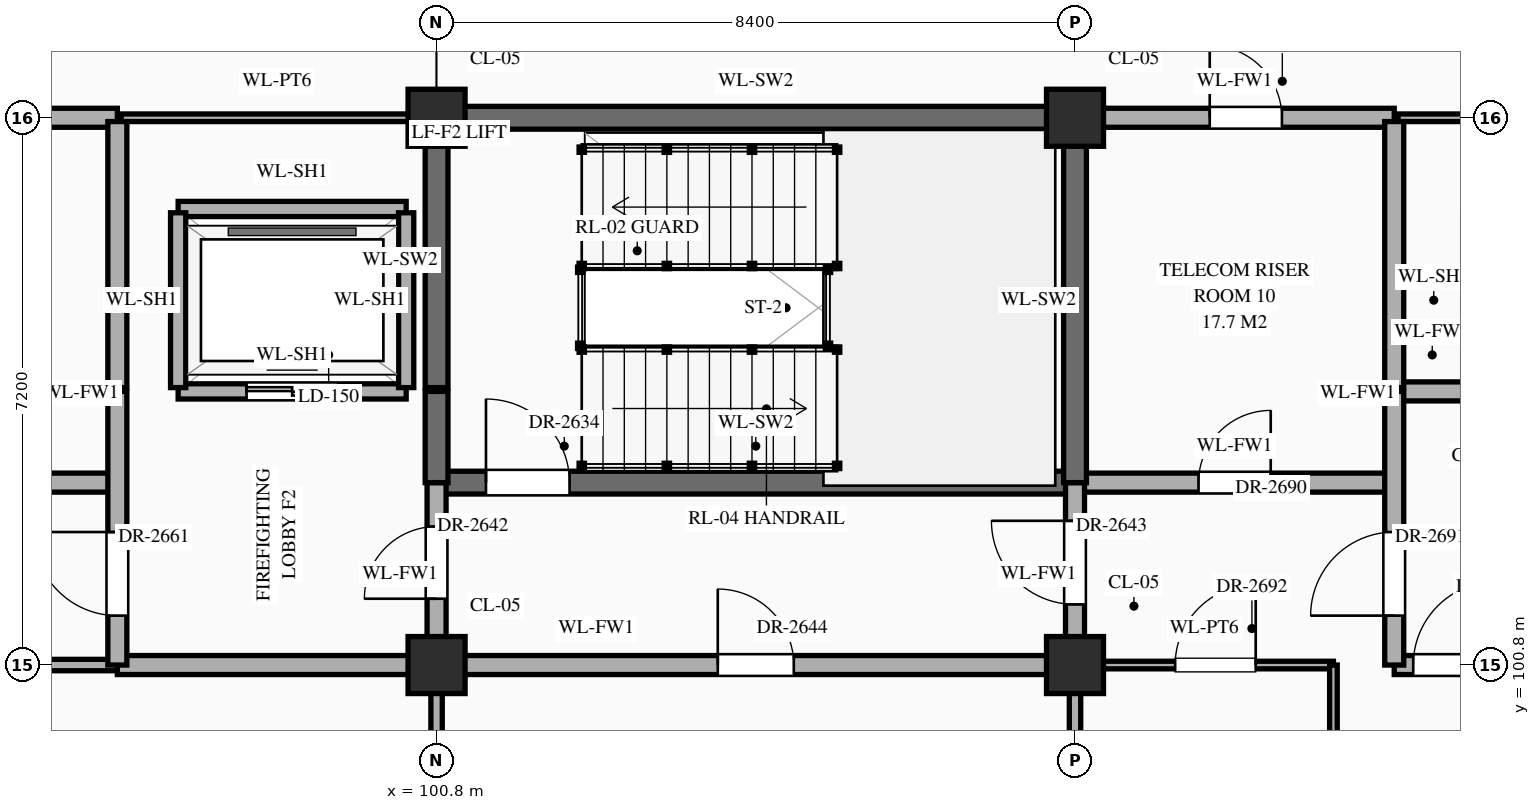
"""IFC4 building model, lengths in metres.
Left out: names, types, materials, properties, quantities, classifications, styles, units other than length and angle.
Written with IfcOpenShell. Run it as: python <this file> out.ifc"""

import sys

from ifc_helpers import new_model, si_unit, direction, frame, frame_2d, origin, origin_2d, place, context, subcontext, project, spatial, rectangle, extrude, element, fill, save


model = new_model("IFC4")
c1 = context("Model", 3, precision=1e-05, world=origin(), true_north=direction((0.0, 1.0)))
c2 = subcontext(c1, "Body", "Model", "MODEL_VIEW")
j1 = project(units=[si_unit("LENGTHUNIT", "METRE"), si_unit("PLANEANGLEUNIT", "RADIAN")], contexts=[c1])
p1 = place(None, origin())
s1 = spatial("IfcSite", under=j1, at=p1, CompositionType="ELEMENT")
p2 = place(p1, origin())
s2 = spatial("IfcBuilding", under=s1, at=p2, CompositionType="ELEMENT")
p3 = place(p2, frame((0.0, 0.0, 39.3)))
s3 = spatial("IfcBuildingStorey", under=s2, at=p3, CompositionType="ELEMENT", Elevation=39.3)
for number, where, z_axis, x_axis in (
    (1, (100.8, 100.8, 0.0), (0.0, 0.0, 1.0), (1.0, 0.0, 0.0)),
    (2, (100.8, 108.0, 0.0), (0.0, 0.0, 1.0), (1.0, 0.0, 0.0)),
    (3, (109.2, 100.8, 0.0), (0.0, 0.0, 1.0), (1.0, 0.0, 0.0)),
    (4, (109.2, 108.0, 0.0), (0.0, 0.0, 1.0), (1.0, 0.0, 0.0)),
):
    element("IfcColumn", number, at=place(p3, frame(where, z_axis=z_axis, x_axis=x_axis)), inside=s3, PredefinedType="COLUMN", context=c2, shape_type="SweptSolid", body=[
        extrude(rectangle(XDim=0.75, YDim=0.75, at=origin_2d()), origin(), (0.0, 0.0, 1.0), 4.2),
    ])
p4 = place(p3, frame((92.4, 100.8, 0.0), z_axis=(0.0, 0.0, 1.0), x_axis=(1.0, 0.0, 0.0)))
e5 = element("IfcWall", 5, at=p4, inside=s3, PredefinedType="STANDARD", context=c2, shape_type="SweptSolid", body=[
    extrude(rectangle(XDim=4.2, YDim=0.15, at=frame_2d((2.1, 0.0))), origin(), (0.0, 0.0, 1.0), 3.1),
])
p5 = place(p4, frame((1.768, 0.0, 0.0)))
e6 = element("IfcOpeningElement", 6, at=p5, cuts=e5, PredefinedType="OPENING", context=c2, shape_type="SweptSolid", body=[
    extrude(rectangle(XDim=0.96, YDim=2.2, at=frame_2d((0.48, 1.1))), frame((0.0, 0.087, 0.0), z_axis=(0.0, -1.0, 0.0), x_axis=(1.0, 0.0, 0.0)), (0.0, 0.0, 1.0), 0.174),
])
p6 = place(p3, frame((96.6, 100.8, 0.0), z_axis=(0.0, 0.0, 1.0), x_axis=(1.0, 0.0, 0.0)))
e7 = element("IfcWall", 7, at=p6, inside=s3, PredefinedType="STANDARD", context=c2, shape_type="SweptSolid", body=[
    extrude(rectangle(XDim=12.6, YDim=0.25, at=frame_2d((6.3, 0.0))), origin(), (0.0, 0.0, 1.0), 3.1),
])
p7 = place(p6, frame((7.9, 0.0, 0.0)))
e8 = element("IfcOpeningElement", 8, at=p7, cuts=e7, PredefinedType="OPENING", context=c2, shape_type="SweptSolid", body=[
    extrude(rectangle(XDim=1.0, YDim=2.2, at=frame_2d((0.5, 1.1))), frame((0.0, 0.137, 0.0), z_axis=(0.0, -1.0, 0.0), x_axis=(1.0, 0.0, 0.0)), (0.0, 0.0, 1.0), 0.274),
])
p8 = place(p3, frame((109.2, 100.8, 0.0), z_axis=(0.0, 0.0, 1.0), x_axis=(1.0, 0.0, 0.0)))
e9 = element("IfcWall", 9, at=p8, inside=s3, PredefinedType="STANDARD", context=c2, shape_type="SweptSolid", body=[
    extrude(rectangle(XDim=3.4, YDim=0.1, at=frame_2d((1.7, 0.0))), origin(), (0.0, 0.0, 1.0), 3.1),
])
p9 = place(p8, frame((1.317, 0.0, 0.0)))
e10 = element("IfcOpeningElement", 10, at=p9, cuts=e9, PredefinedType="OPENING", context=c2, shape_type="SweptSolid", body=[
    extrude(rectangle(XDim=1.06, YDim=2.4, at=frame_2d((0.53, 1.2))), frame((0.0, 0.062, 0.0), z_axis=(0.0, -1.0, 0.0), x_axis=(1.0, 0.0, 0.0)), (0.0, 0.0, 1.0), 0.124),
])
p10 = place(p3, frame((113.4, 100.8, 0.0), z_axis=(0.0, 0.0, 1.0), x_axis=(1.0, 0.0, 0.0)))
e11 = element("IfcWall", 11, at=p10, inside=s3, PredefinedType="STANDARD", context=c2, shape_type="SweptSolid", body=[
    extrude(rectangle(XDim=4.2, YDim=0.25, at=frame_2d((2.1, 0.0))), origin(), (0.0, 0.0, 1.0), 3.1),
])
p11 = place(p10, frame((0.25, 0.0, 0.0)))
e12 = element("IfcOpeningElement", 12, at=p11, cuts=e11, PredefinedType="OPENING", context=c2, shape_type="SweptSolid", body=[
    extrude(rectangle(XDim=1.1, YDim=2.2, at=frame_2d((0.55, 1.1))), frame((0.0, 0.137, 0.0), z_axis=(0.0, -1.0, 0.0), x_axis=(1.0, 0.0, 0.0)), (0.0, 0.0, 1.0), 0.274),
])
p12 = place(p10, frame((2.252, 0.0, 0.0)))
e13 = element("IfcOpeningElement", 13, at=p12, cuts=e11, PredefinedType="OPENING", context=c2, shape_type="SweptSolid", body=[
    extrude(rectangle(XDim=1.0, YDim=2.2, at=frame_2d((0.5, 1.1))), frame((0.0, 0.137, 0.0), z_axis=(0.0, -1.0, 0.0), x_axis=(1.0, 0.0, 0.0)), (0.0, 0.0, 1.0), 0.274),
])
p13 = place(p3, frame((92.4, 103.2, 0.0), z_axis=(0.0, 0.0, 1.0), x_axis=(1.0, 0.0, 0.0)))
e14 = element("IfcWall", 14, at=p13, inside=s3, PredefinedType="STANDARD", context=c2, shape_type="SweptSolid", body=[
    extrude(rectangle(XDim=4.2, YDim=0.25, at=frame_2d((2.1, 0.0))), origin(), (0.0, 0.0, 1.0), 3.95),
])
p14 = place(p13, frame((1.625, 0.0, 0.0)))
e15 = element("IfcOpeningElement", 15, at=p14, cuts=e14, PredefinedType="OPENING", context=c2, shape_type="SweptSolid", body=[
    extrude(rectangle(XDim=0.95, YDim=2.15, at=frame_2d((0.475, 1.075))), frame((0.0, 0.137, 0.0), z_axis=(0.0, -1.0, 0.0), x_axis=(1.0, 0.0, 0.0)), (0.0, 0.0, 1.0), 0.274),
])
p15 = place(p3, frame((100.8, 103.2, 0.0), z_axis=(0.0, 0.0, 1.0), x_axis=(1.0, 0.0, 0.0)))
e16 = element("IfcWall", 16, at=p15, inside=s3, PredefinedType="SHEAR", context=c2, shape_type="SweptSolid", body=[
    extrude(rectangle(XDim=8.4, YDim=0.3, at=frame_2d((4.2, 0.0))), origin(), (0.0, 0.0, 1.0), 3.95),
])
p16 = place(p15, frame((0.65, 0.0, 0.0)))
e17 = element("IfcOpeningElement", 17, at=p16, cuts=e16, PredefinedType="OPENING", context=c2, shape_type="SweptSolid", body=[
    extrude(rectangle(XDim=1.1, YDim=2.2, at=frame_2d((0.55, 1.1))), frame((0.0, 0.162, 0.0), z_axis=(0.0, -1.0, 0.0), x_axis=(1.0, 0.0, 0.0)), (0.0, 0.0, 1.0), 0.324),
])
p17 = place(p3, frame((109.2, 103.2, 0.0), z_axis=(0.0, 0.0, 1.0), x_axis=(1.0, 0.0, 0.0)))
e18 = element("IfcWall", 18, at=p17, inside=s3, PredefinedType="STANDARD", context=c2, shape_type="SweptSolid", body=[
    extrude(rectangle(XDim=4.2, YDim=0.25, at=frame_2d((2.1, 0.0))), origin(), (0.0, 0.0, 1.0), 3.95),
])
p18 = place(p17, frame((1.625, 0.0, 0.0)))
e19 = element("IfcOpeningElement", 19, at=p18, cuts=e18, PredefinedType="OPENING", context=c2, shape_type="SweptSolid", body=[
    extrude(rectangle(XDim=0.95, YDim=2.15, at=frame_2d((0.475, 1.075))), frame((0.0, 0.137, 0.0), z_axis=(0.0, -1.0, 0.0), x_axis=(1.0, 0.0, 0.0)), (0.0, 0.0, 1.0), 0.274),
])
p19 = place(p3, frame((97.4, 104.4, 0.0), z_axis=(0.0, 0.0, 1.0), x_axis=(1.0, 0.0, 0.0)))
e20 = element("IfcWall", 20, at=p19, inside=s3, PredefinedType="STANDARD", context=c2, shape_type="SweptSolid", body=[
    extrude(rectangle(XDim=3.0, YDim=0.2, at=frame_2d((1.5, 0.0))), origin(), (0.0, 0.0, 1.0), 3.95),
])
p20 = place(p19, frame((0.9, 0.0, 0.0)))
e21 = element("IfcOpeningElement", 21, at=p20, cuts=e20, PredefinedType="OPENING", context=c2, shape_type="SweptSolid", body=[
    extrude(rectangle(XDim=1.2, YDim=2.15, at=frame_2d((0.6, 1.075))), frame((0.0, 0.112, 0.0), z_axis=(0.0, -1.0, 0.0), x_axis=(1.0, 0.0, 0.0)), (0.0, 0.0, 1.0), 0.224),
])
p21 = place(p3, frame((113.45, 104.4, 0.0), z_axis=(0.0, 0.0, 1.0), x_axis=(1.0, 0.0, 0.0)))
e22 = element("IfcWall", 22, at=p21, inside=s3, PredefinedType="STANDARD", context=c2, shape_type="SweptSolid", body=[
    extrude(rectangle(XDim=0.9, YDim=0.25, at=frame_2d((0.45, 0.0))), origin(), (0.0, 0.0, 1.0), 3.95),
])
p22 = place(p3, frame((97.4, 106.8, 0.0), z_axis=(0.0, 0.0, 1.0), x_axis=(1.0, 0.0, 0.0)))
e23 = element("IfcWall", 23, at=p22, inside=s3, PredefinedType="STANDARD", context=c2, shape_type="SweptSolid", body=[
    extrude(rectangle(XDim=3.0, YDim=0.2, at=frame_2d((1.5, 0.0))), origin(), (0.0, 0.0, 1.0), 3.95),
])
p23 = place(p3, frame((92.4, 108.0, 0.0), z_axis=(0.0, 0.0, 1.0), x_axis=(1.0, 0.0, 0.0)))
e24 = element("IfcWall", 24, at=p23, inside=s3, PredefinedType="STANDARD", context=c2, shape_type="SweptSolid", body=[
    extrude(rectangle(XDim=4.2, YDim=0.25, at=frame_2d((2.1, 0.0))), origin(), (0.0, 0.0, 1.0), 3.1),
])
p24 = place(p23, frame((1.698, 0.0, 0.0)))
e25 = element("IfcOpeningElement", 25, at=p24, cuts=e24, PredefinedType="OPENING", context=c2, shape_type="SweptSolid", body=[
    extrude(rectangle(XDim=1.1, YDim=2.2, at=frame_2d((0.55, 1.1))), frame((0.0, 0.137, 0.0), z_axis=(0.0, -1.0, 0.0), x_axis=(1.0, 0.0, 0.0)), (0.0, 0.0, 1.0), 0.274),
])
p25 = place(p3, frame((96.65, 108.0, 0.0), z_axis=(0.0, 0.0, 1.0), x_axis=(1.0, 0.0, 0.0)))
e26 = element("IfcWall", 26, at=p25, inside=s3, PredefinedType="STANDARD", context=c2, shape_type="SweptSolid", body=[
    extrude(rectangle(XDim=4.1, YDim=0.1, at=frame_2d((2.05, 0.0))), origin(), (0.0, 0.0, 1.0), 3.1),
])
p26 = place(p3, frame((100.8, 108.0, 0.0), z_axis=(0.0, 0.0, 1.0), x_axis=(1.0, 0.0, 0.0)))
e27 = element("IfcWall", 27, at=p26, inside=s3, PredefinedType="SHEAR", context=c2, shape_type="SweptSolid", body=[
    extrude(rectangle(XDim=8.4, YDim=0.3, at=frame_2d((4.2, 0.0))), origin(), (0.0, 0.0, 1.0), 3.95),
])
p27 = place(p3, frame((109.2, 108.0, 0.0), z_axis=(0.0, 0.0, 1.0), x_axis=(1.0, 0.0, 0.0)))
e28 = element("IfcWall", 28, at=p27, inside=s3, PredefinedType="STANDARD", context=c2, shape_type="SweptSolid", body=[
    extrude(rectangle(XDim=4.2, YDim=0.25, at=frame_2d((2.1, 0.0))), origin(), (0.0, 0.0, 1.0), 3.1),
])
p28 = place(p27, frame((1.772, 0.0, 0.0)))
e29 = element("IfcOpeningElement", 29, at=p28, cuts=e28, PredefinedType="OPENING", context=c2, shape_type="SweptSolid", body=[
    extrude(rectangle(XDim=0.95, YDim=2.15, at=frame_2d((0.475, 1.075))), frame((0.0, 0.137, 0.0), z_axis=(0.0, -1.0, 0.0), x_axis=(1.0, 0.0, 0.0)), (0.0, 0.0, 1.0), 0.274),
])
p29 = place(p3, frame((113.45, 108.0, 0.0), z_axis=(0.0, 0.0, 1.0), x_axis=(1.0, 0.0, 0.0)))
e30 = element("IfcWall", 30, at=p29, inside=s3, PredefinedType="STANDARD", context=c2, shape_type="SweptSolid", body=[
    extrude(rectangle(XDim=4.06, YDim=0.1, at=frame_2d((2.03, 0.0))), origin(), (0.0, 0.0, 1.0), 3.1),
])
p30 = place(p3, frame((96.6, 100.8, 0.0), z_axis=(0.0, 0.0, 1.0), x_axis=(0.0, 1.0, 0.0)))
e31 = element("IfcWall", 31, at=p30, inside=s3, PredefinedType="STANDARD", context=c2, shape_type="SweptSolid", body=[
    extrude(rectangle(XDim=3.6, YDim=0.25, at=frame_2d((1.8, 0.0))), origin(), (0.0, 0.0, 1.0), 3.95),
])
p31 = place(p30, frame((0.65, 0.0, 0.0)))
e32 = element("IfcOpeningElement", 32, at=p31, cuts=e31, PredefinedType="OPENING", context=c2, shape_type="SweptSolid", body=[
    extrude(rectangle(XDim=1.1, YDim=2.2, at=frame_2d((0.55, 1.1))), frame((0.0, 0.137, 0.0), z_axis=(0.0, -1.0, 0.0), x_axis=(1.0, 0.0, 0.0)), (0.0, 0.0, 1.0), 0.274),
])
p32 = place(p3, frame((96.6, 104.45, 0.0), z_axis=(0.0, 0.0, 1.0), x_axis=(0.0, 1.0, 0.0)))
e33 = element("IfcWall", 33, at=p32, inside=s3, PredefinedType="STANDARD", context=c2, shape_type="SweptSolid", body=[
    extrude(rectangle(XDim=3.5, YDim=0.25, at=frame_2d((1.75, 0.0))), origin(), (0.0, 0.0, 1.0), 3.95),
])
for number, where, z_axis, x_axis in (
    (34, (97.4, 104.45, 0.0), (0.0, 0.0, 1.0), (0.0, 1.0, 0.0)),
    (35, (100.4, 104.45, 0.0), (0.0, 0.0, 1.0), (0.0, 1.0, 0.0)),
):
    element("IfcWall", number, at=place(p3, frame(where, z_axis=z_axis, x_axis=x_axis)), inside=s3, PredefinedType="STANDARD", context=c2, shape_type="SweptSolid", body=[
        extrude(rectangle(XDim=2.3, YDim=0.2, at=frame_2d((1.15, 0.0))), origin(), (0.0, 0.0, 1.0), 3.95),
    ])
p33 = place(p3, frame((100.8, 96.0, 0.0), z_axis=(0.0, 0.0, 1.0), x_axis=(0.0, 1.0, 0.0)))
e36 = element("IfcWall", 36, at=p33, inside=s3, PredefinedType="STANDARD", context=c2, shape_type="SweptSolid", body=[
    extrude(rectangle(XDim=4.8, YDim=0.15, at=frame_2d((2.4, 0.0))), origin(), (0.0, 0.0, 1.0), 3.2),
])
p34 = place(p3, frame((100.8, 100.8, 0.0), z_axis=(0.0, 0.0, 1.0), x_axis=(0.0, 1.0, 0.0)))
e37 = element("IfcWall", 37, at=p34, inside=s3, PredefinedType="STANDARD", context=c2, shape_type="SweptSolid", body=[
    extrude(rectangle(XDim=2.4, YDim=0.25, at=frame_2d((1.2, 0.0))), origin(), (0.0, 0.0, 1.0), 3.2),
])
p35 = place(p34, frame((0.873, 0.0, 0.0)))
e38 = element("IfcOpeningElement", 38, at=p35, cuts=e37, PredefinedType="OPENING", context=c2, shape_type="SweptSolid", body=[
    extrude(rectangle(XDim=0.95, YDim=2.15, at=frame_2d((0.475, 1.075))), frame((0.0, 0.137, 0.0), z_axis=(0.0, -1.0, 0.0), x_axis=(1.0, 0.0, 0.0)), (0.0, 0.0, 1.0), 0.274),
])
p36 = place(p3, frame((100.8, 103.2, 0.0), z_axis=(0.0, 0.0, 1.0), x_axis=(0.0, 1.0, 0.0)))
e39 = element("IfcWall", 39, at=p36, inside=s3, PredefinedType="SHEAR", context=c2, shape_type="SweptSolid", body=[
    extrude(rectangle(XDim=1.2, YDim=0.3, at=frame_2d((0.6, 0.0))), origin(), (0.0, 0.0, 1.0), 3.95),
])
p37 = place(p3, frame((100.8, 104.45, 0.0), z_axis=(0.0, 0.0, 1.0), x_axis=(0.0, 1.0, 0.0)))
e40 = element("IfcWall", 40, at=p37, inside=s3, PredefinedType="SHEAR", context=c2, shape_type="SweptSolid", body=[
    extrude(rectangle(XDim=3.5, YDim=0.3, at=frame_2d((1.75, 0.0))), origin(), (0.0, 0.0, 1.0), 3.95),
])
p38 = place(p3, frame((109.2, 96.0, 0.0), z_axis=(0.0, 0.0, 1.0), x_axis=(0.0, 1.0, 0.0)))
e41 = element("IfcWall", 41, at=p38, inside=s3, PredefinedType="STANDARD", context=c2, shape_type="SweptSolid", body=[
    extrude(rectangle(XDim=4.8, YDim=0.15, at=frame_2d((2.4, 0.0))), origin(), (0.0, 0.0, 1.0), 3.2),
])
p39 = place(p3, frame((109.2, 100.8, 0.0), z_axis=(0.0, 0.0, 1.0), x_axis=(0.0, 1.0, 0.0)))
e42 = element("IfcWall", 42, at=p39, inside=s3, PredefinedType="STANDARD", context=c2, shape_type="SweptSolid", body=[
    extrude(rectangle(XDim=2.4, YDim=0.25, at=frame_2d((1.2, 0.0))), origin(), (0.0, 0.0, 1.0), 3.2),
])
p40 = place(p39, frame((0.798, 0.0, 0.0)))
e43 = element("IfcOpeningElement", 43, at=p40, cuts=e42, PredefinedType="OPENING", context=c2, shape_type="SweptSolid", body=[
    extrude(rectangle(XDim=1.1, YDim=2.2, at=frame_2d((0.55, 1.1))), frame((0.0, 0.137, 0.0), z_axis=(0.0, -1.0, 0.0), x_axis=(1.0, 0.0, 0.0)), (0.0, 0.0, 1.0), 0.274),
])
p41 = place(p3, frame((109.2, 103.2, 0.0), z_axis=(0.0, 0.0, 1.0), x_axis=(0.0, 1.0, 0.0)))
e44 = element("IfcWall", 44, at=p41, inside=s3, PredefinedType="SHEAR", context=c2, shape_type="SweptSolid", body=[
    extrude(rectangle(XDim=4.8, YDim=0.3, at=frame_2d((2.4, 0.0))), origin(), (0.0, 0.0, 1.0), 3.95),
])
p42 = place(p3, frame((112.6, 96.0, 0.0), z_axis=(0.0, 0.0, 1.0), x_axis=(0.0, 1.0, 0.0)))
e45 = element("IfcWall", 45, at=p42, inside=s3, PredefinedType="STANDARD", context=c2, shape_type="SweptSolid", body=[
    extrude(rectangle(XDim=4.8, YDim=0.1, at=frame_2d((2.4, 0.0))), origin(), (0.0, 0.0, 1.0), 3.95),
])
p43 = place(p42, frame((1.88, 0.0, 0.0)))
e46 = element("IfcOpeningElement", 46, at=p43, cuts=e45, PredefinedType="OPENING", context=c2, shape_type="SweptSolid", body=[
    extrude(rectangle(XDim=1.04, YDim=2.2, at=frame_2d((0.52, 1.1))), frame((0.0, 0.062, 0.0), z_axis=(0.0, -1.0, 0.0), x_axis=(1.0, 0.0, 0.0)), (0.0, 0.0, 1.0), 0.124),
])
p44 = place(p3, frame((113.4, 100.8, 0.0), z_axis=(0.0, 0.0, 1.0), x_axis=(0.0, 1.0, 0.0)))
e47 = element("IfcWall", 47, at=p44, inside=s3, PredefinedType="STANDARD", context=c2, shape_type="SweptSolid", body=[
    extrude(rectangle(XDim=3.6, YDim=0.25, at=frame_2d((1.8, 0.0))), origin(), (0.0, 0.0, 1.0), 3.95),
])
p45 = place(p44, frame((0.65, 0.0, 0.0)))
e48 = element("IfcOpeningElement", 48, at=p45, cuts=e47, PredefinedType="OPENING", context=c2, shape_type="SweptSolid", body=[
    extrude(rectangle(XDim=1.1, YDim=2.2, at=frame_2d((0.55, 1.1))), frame((0.0, 0.137, 0.0), z_axis=(0.0, -1.0, 0.0), x_axis=(1.0, 0.0, 0.0)), (0.0, 0.0, 1.0), 0.274),
])
p46 = place(p3, frame((113.4, 104.45, 0.0), z_axis=(0.0, 0.0, 1.0), x_axis=(0.0, 1.0, 0.0)))
e49 = element("IfcWall", 49, at=p46, inside=s3, PredefinedType="STANDARD", context=c2, shape_type="SweptSolid", body=[
    extrude(rectangle(XDim=3.5, YDim=0.25, at=frame_2d((1.75, 0.0))), origin(), (0.0, 0.0, 1.0), 3.95),
])
p47 = place(p20, origin())
e50 = element("IfcDoor", 50, at=p47, inside=s3, OperationType="DOUBLE_DOOR_SLIDING", PredefinedType="DOOR", context=c2, shape_type="SweptSolid", body=[
    extrude(rectangle(XDim=1.2, YDim=2.15, at=frame_2d((0.6, 1.075))), frame((0.0, 0.025, 0.0), z_axis=(0.0, -1.0, 0.0), x_axis=(1.0, 0.0, 0.0)), (0.0, 0.0, 1.0), 0.05),
])
fill(e21, e50)
p48 = place(p16, origin())
e51 = element("IfcDoor", 51, at=p48, inside=s3, OperationType="SINGLE_SWING_LEFT", PredefinedType="DOOR", context=c2, shape_type="SweptSolid", body=[
    extrude(rectangle(XDim=1.1, YDim=2.2, at=frame_2d((0.55, 1.1))), frame((0.0, 0.025, 0.0), z_axis=(0.0, -1.0, 0.0), x_axis=(1.0, 0.0, 0.0)), (0.0, 0.0, 1.0), 0.05),
])
fill(e17, e51)
p49 = place(p35, origin())
e52 = element("IfcDoor", 52, at=p49, inside=s3, OperationType="SINGLE_SWING_LEFT", PredefinedType="DOOR", context=c2, shape_type="SweptSolid", body=[
    extrude(rectangle(XDim=0.95, YDim=2.15, at=frame_2d((0.475, 1.075))), frame((0.0, 0.025, 0.0), z_axis=(0.0, -1.0, 0.0), x_axis=(1.0, 0.0, 0.0)), (0.0, 0.0, 1.0), 0.05),
])
fill(e38, e52)
p50 = place(p40, origin())
e53 = element("IfcDoor", 53, at=p50, inside=s3, OperationType="SINGLE_SWING_RIGHT", PredefinedType="DOOR", context=c2, shape_type="SweptSolid", body=[
    extrude(rectangle(XDim=1.1, YDim=2.2, at=frame_2d((0.55, 1.1))), frame((0.0, 0.025, 0.0), z_axis=(0.0, -1.0, 0.0), x_axis=(1.0, 0.0, 0.0)), (0.0, 0.0, 1.0), 0.05),
])
fill(e43, e53)
p51 = place(p7, origin())
e54 = element("IfcDoor", 54, at=p51, inside=s3, OperationType="SINGLE_SWING_LEFT", PredefinedType="DOOR", context=c2, shape_type="SweptSolid", body=[
    extrude(rectangle(XDim=1.0, YDim=2.2, at=frame_2d((0.5, 1.1))), frame((0.0, 0.025, 0.0), z_axis=(0.0, -1.0, 0.0), x_axis=(1.0, 0.0, 0.0)), (0.0, 0.0, 1.0), 0.05),
])
fill(e8, e54)
p52 = place(p31, origin())
e55 = element("IfcDoor", 55, at=p52, inside=s3, OperationType="SINGLE_SWING_RIGHT", PredefinedType="DOOR", context=c2, shape_type="SweptSolid", body=[
    extrude(rectangle(XDim=1.1, YDim=2.2, at=frame_2d((0.55, 1.1))), frame((0.0, 0.025, 0.0), z_axis=(0.0, -1.0, 0.0), x_axis=(1.0, 0.0, 0.0)), (0.0, 0.0, 1.0), 0.05),
])
fill(e32, e55)
p53 = place(p18, origin())
e56 = element("IfcDoor", 56, at=p53, inside=s3, OperationType="SINGLE_SWING_RIGHT", PredefinedType="DOOR", context=c2, shape_type="SweptSolid", body=[
    extrude(rectangle(XDim=0.95, YDim=2.15, at=frame_2d((0.475, 1.075))), frame((0.0, 0.025, 0.0), z_axis=(0.0, -1.0, 0.0), x_axis=(1.0, 0.0, 0.0)), (0.0, 0.0, 1.0), 0.05),
])
fill(e19, e56)
p54 = place(p45, origin())
e57 = element("IfcDoor", 57, at=p54, inside=s3, OperationType="SINGLE_SWING_LEFT", PredefinedType="DOOR", context=c2, shape_type="SweptSolid", body=[
    extrude(rectangle(XDim=1.1, YDim=2.2, at=frame_2d((0.55, 1.1))), frame((0.0, 0.025, 0.0), z_axis=(0.0, -1.0, 0.0), x_axis=(1.0, 0.0, 0.0)), (0.0, 0.0, 1.0), 0.05),
])
fill(e48, e57)
p55 = place(p9, origin())
e58 = element("IfcDoor", 58, at=p55, inside=s3, OperationType="SINGLE_SWING_RIGHT", PredefinedType="DOOR", context=c2, shape_type="SweptSolid", body=[
    extrude(rectangle(XDim=1.06, YDim=2.4, at=frame_2d((0.53, 1.2))), frame((0.0, 0.025, 0.0), z_axis=(0.0, -1.0, 0.0), x_axis=(1.0, 0.0, 0.0)), (0.0, 0.0, 1.0), 0.05),
])
fill(e10, e58)
p56 = place(p28, origin())
e59 = element("IfcDoor", 59, at=p56, inside=s3, OperationType="SINGLE_SWING_LEFT", PredefinedType="DOOR", context=c2, shape_type="SweptSolid", body=[
    extrude(rectangle(XDim=0.95, YDim=2.15, at=frame_2d((0.475, 1.075))), frame((0.0, 0.025, 0.0), z_axis=(0.0, -1.0, 0.0), x_axis=(1.0, 0.0, 0.0)), (0.0, 0.0, 1.0), 0.05),
])
fill(e29, e59)
p57 = place(p11, origin())
e60 = element("IfcDoor", 60, at=p57, inside=s3, OperationType="SINGLE_SWING_RIGHT", PredefinedType="DOOR", context=c2, shape_type="SweptSolid", body=[
    extrude(rectangle(XDim=1.1, YDim=2.2, at=frame_2d((0.55, 1.1))), frame((0.0, 0.025, 0.0), z_axis=(0.0, -1.0, 0.0), x_axis=(1.0, 0.0, 0.0)), (0.0, 0.0, 1.0), 0.05),
])
fill(e12, e60)
save(model, sys.argv[1])
